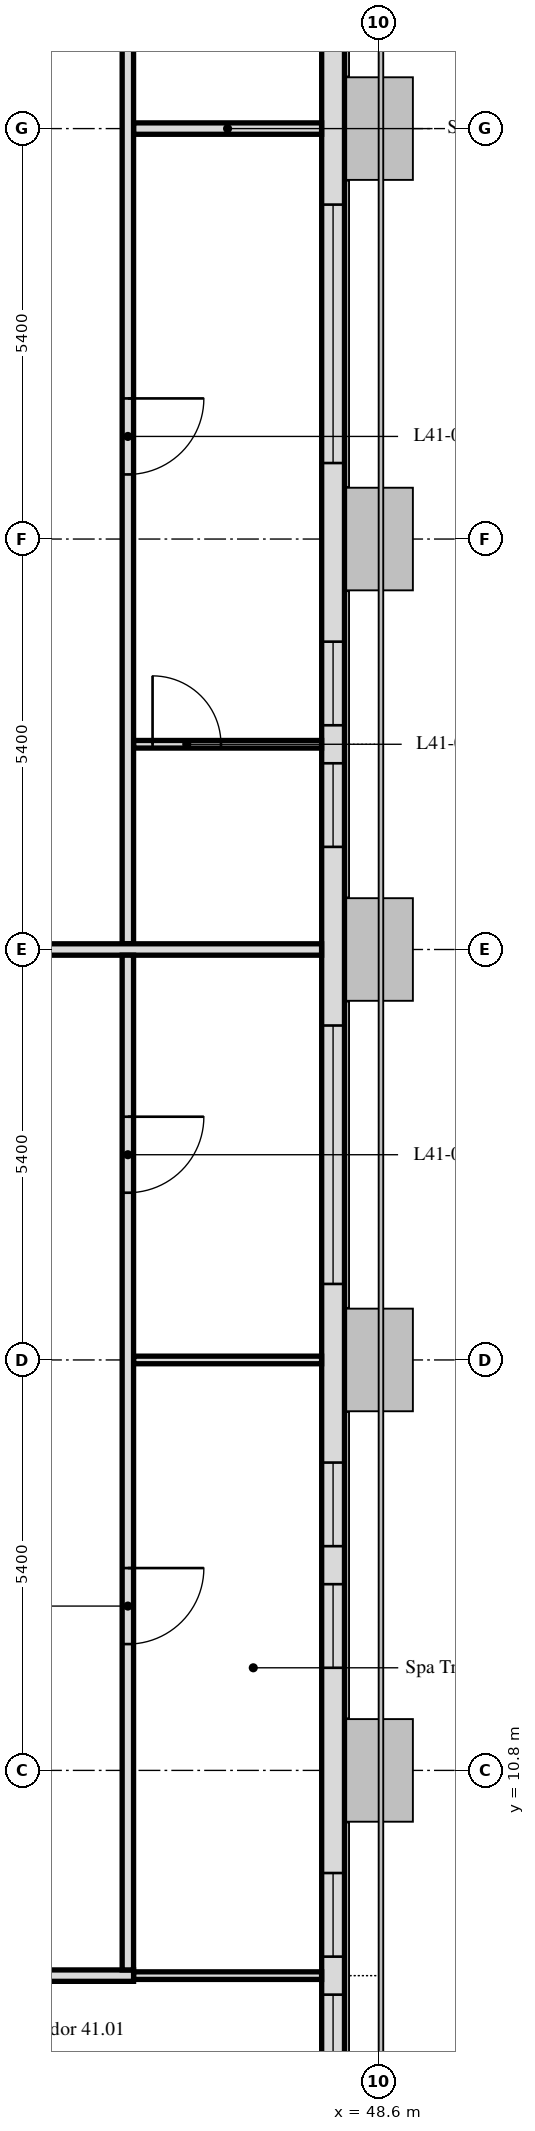
"""IFC4 building model, lengths in metres.
Left out: names, types, materials, properties, quantities, classifications, styles, units other than length and angle.
Written with IfcOpenShell. Run it as: python <this file> out.ifc"""

import sys

from ifc_helpers import new_model, si_unit, direction, frame, frame_2d, origin, place, context, subcontext, project, spatial, rectangle, extrude, element, fill, save


model = new_model("IFC4")
c1 = context("Model", 3, precision=1e-05, world=origin(), true_north=direction((0.0, 1.0)))
c2 = subcontext(c1, "Body", "Model", "MODEL_VIEW")
j1 = project(units=[si_unit("LENGTHUNIT", "METRE"), si_unit("PLANEANGLEUNIT", "RADIAN")], contexts=[c1])
p1 = place(None, origin())
s1 = spatial("IfcSite", under=j1, at=p1, CompositionType="ELEMENT")
p2 = place(p1, origin())
s2 = spatial("IfcBuilding", under=s1, at=p2, CompositionType="ELEMENT")
p3 = place(p2, frame((0.0, 0.0, 172.6)))
s3 = spatial("IfcBuildingStorey", under=s2, at=p3, CompositionType="ELEMENT", Elevation=172.6)
p4 = place(p3, frame((48.0, 5.586, 0.0), z_axis=(0.0, 0.0, 1.0), x_axis=(0.0, 1.0, 0.0)))
e1 = element("IfcWall", 1, at=p4, inside=s3, PredefinedType="SOLIDWALL", context=c2, shape_type="SweptSolid", body=[
    extrude(rectangle(XDim=32.027, YDim=0.3, at=frame_2d((16.014, 0.0))), origin(), (0.0, 0.0, 1.0), 2.8),
])
p5 = place(p4, frame((1.164, 0.0, 0.9)))
e2 = element("IfcOpeningElement", 2, at=p5, cuts=e1, PredefinedType="OPENING", context=c2, shape_type="SweptSolid", body=[
    extrude(rectangle(XDim=1.1, YDim=1.7, at=frame_2d((0.55, 0.85))), frame((0.0, 0.16, 0.0), z_axis=(0.0, -1.0, 0.0), x_axis=(1.0, 0.0, 0.0)), (0.0, 0.0, 1.0), 0.32),
])
p6 = place(p4, frame((2.764, 0.0, 0.9)))
e3 = element("IfcOpeningElement", 3, at=p6, cuts=e1, PredefinedType="OPENING", context=c2, shape_type="SweptSolid", body=[
    extrude(rectangle(XDim=1.1, YDim=1.7, at=frame_2d((0.55, 0.85))), frame((0.0, 0.16, 0.0), z_axis=(0.0, -1.0, 0.0), x_axis=(1.0, 0.0, 0.0)), (0.0, 0.0, 1.0), 0.32),
])
p7 = place(p4, frame((6.564, 0.0, 0.9)))
e4 = element("IfcOpeningElement", 4, at=p7, cuts=e1, PredefinedType="OPENING", context=c2, shape_type="SweptSolid", body=[
    extrude(rectangle(XDim=1.1, YDim=1.7, at=frame_2d((0.55, 0.85))), frame((0.0, 0.16, 0.0), z_axis=(0.0, -1.0, 0.0), x_axis=(1.0, 0.0, 0.0)), (0.0, 0.0, 1.0), 0.32),
])
p8 = place(p4, frame((8.164, 0.0, 0.9)))
e5 = element("IfcOpeningElement", 5, at=p8, cuts=e1, PredefinedType="OPENING", context=c2, shape_type="SweptSolid", body=[
    extrude(rectangle(XDim=1.1, YDim=1.7, at=frame_2d((0.55, 0.85))), frame((0.0, 0.16, 0.0), z_axis=(0.0, -1.0, 0.0), x_axis=(1.0, 0.0, 0.0)), (0.0, 0.0, 1.0), 0.32),
])
p9 = place(p4, frame((11.614, 0.0, 0.9)))
e6 = element("IfcOpeningElement", 6, at=p9, cuts=e1, PredefinedType="OPENING", context=c2, shape_type="SweptSolid", body=[
    extrude(rectangle(XDim=3.4, YDim=1.7, at=frame_2d((1.7, 0.85))), frame((0.0, 0.16, 0.0), z_axis=(0.0, -1.0, 0.0), x_axis=(1.0, 0.0, 0.0)), (0.0, 0.0, 1.0), 0.32),
])
p10 = place(p4, frame((17.364, 0.0, 0.9)))
e7 = element("IfcOpeningElement", 7, at=p10, cuts=e1, PredefinedType="OPENING", context=c2, shape_type="SweptSolid", body=[
    extrude(rectangle(XDim=1.1, YDim=1.7, at=frame_2d((0.55, 0.85))), frame((0.0, 0.16, 0.0), z_axis=(0.0, -1.0, 0.0), x_axis=(1.0, 0.0, 0.0)), (0.0, 0.0, 1.0), 0.32),
])
p11 = place(p4, frame((18.964, 0.0, 0.9)))
e8 = element("IfcOpeningElement", 8, at=p11, cuts=e1, PredefinedType="OPENING", context=c2, shape_type="SweptSolid", body=[
    extrude(rectangle(XDim=1.1, YDim=1.7, at=frame_2d((0.55, 0.85))), frame((0.0, 0.16, 0.0), z_axis=(0.0, -1.0, 0.0), x_axis=(1.0, 0.0, 0.0)), (0.0, 0.0, 1.0), 0.32),
])
p12 = place(p4, frame((22.414, 0.0, 0.9)))
e9 = element("IfcOpeningElement", 9, at=p12, cuts=e1, PredefinedType="OPENING", context=c2, shape_type="SweptSolid", body=[
    extrude(rectangle(XDim=3.4, YDim=1.7, at=frame_2d((1.7, 0.85))), frame((0.0, 0.16, 0.0), z_axis=(0.0, -1.0, 0.0), x_axis=(1.0, 0.0, 0.0)), (0.0, 0.0, 1.0), 0.32),
])
p13 = place(p4, frame((28.164, 0.0, 0.9)))
e10 = element("IfcOpeningElement", 10, at=p13, cuts=e1, PredefinedType="OPENING", context=c2, shape_type="SweptSolid", body=[
    extrude(rectangle(XDim=1.1, YDim=1.7, at=frame_2d((0.55, 0.85))), frame((0.0, 0.16, 0.0), z_axis=(0.0, -1.0, 0.0), x_axis=(1.0, 0.0, 0.0)), (0.0, 0.0, 1.0), 0.32),
])
p14 = place(p4, frame((29.764, 0.0, 0.9)))
e11 = element("IfcOpeningElement", 11, at=p14, cuts=e1, PredefinedType="OPENING", context=c2, shape_type="SweptSolid", body=[
    extrude(rectangle(XDim=1.1, YDim=1.7, at=frame_2d((0.55, 0.85))), frame((0.0, 0.16, 0.0), z_axis=(0.0, -1.0, 0.0), x_axis=(1.0, 0.0, 0.0)), (0.0, 0.0, 1.0), 0.32),
])
p15 = place(p3, frame((45.375, 32.4, 0.0), z_axis=(0.0, 0.0, 1.0), x_axis=(1.0, 0.0, 0.0)))
e12 = element("IfcWall", 12, at=p15, inside=s3, PredefinedType="PARTITIONING", context=c2, shape_type="SweptSolid", body=[
    extrude(rectangle(XDim=2.474, YDim=0.15, at=frame_2d((1.237, 0.0))), origin(), (0.0, 0.0, 1.0), 2.2),
])
p16 = place(p3, frame((45.375, 24.3, 0.0), z_axis=(0.0, 0.0, 1.0), x_axis=(1.0, 0.0, 0.0)))
e13 = element("IfcWall", 13, at=p16, inside=s3, PredefinedType="PARTITIONING", context=c2, shape_type="SweptSolid", body=[
    extrude(rectangle(XDim=2.474, YDim=0.1, at=frame_2d((1.237, 0.0))), origin(), (0.0, 0.0, 1.0), 2.8),
])
p17 = place(p16, frame((0.25, 0.0, 0.0)))
e14 = element("IfcOpeningElement", 14, at=p17, cuts=e13, PredefinedType="OPENING", context=c2, shape_type="SweptSolid", body=[
    extrude(rectangle(XDim=0.9, YDim=2.1, at=frame_2d((0.45, 1.05))), frame((0.0, 0.05, 0.0), z_axis=(0.0, -1.0, 0.0), x_axis=(1.0, 0.0, 0.0)), (0.0, 0.0, 1.0), 0.1),
])
p18 = place(p3, frame((45.3, 37.275, 0.0), z_axis=(0.0, 0.0, 1.0), x_axis=(0.0, -1.0, 0.0)))
e15 = element("IfcWall", 15, at=p18, inside=s3, PredefinedType="PARTITIONING", context=c2, shape_type="SweptSolid", body=[
    extrude(rectangle(XDim=15.6, YDim=0.15, at=frame_2d((7.8, 0.0))), origin(), (0.0, 0.0, 1.0), 2.2),
])
p19 = place(p18, frame((1.9, 0.0, 0.0)))
e16 = element("IfcOpeningElement", 16, at=p19, cuts=e15, PredefinedType="OPENING", context=c2, shape_type="SweptSolid", body=[
    extrude(rectangle(XDim=1.0, YDim=2.1, at=frame_2d((0.5, 1.05))), frame((0.0, 0.075, 0.0), z_axis=(0.0, -1.0, 0.0), x_axis=(1.0, 0.0, 0.0)), (0.0, 0.0, 1.0), 0.15),
])
p20 = place(p18, frame((8.425, 0.0, 0.0)))
e17 = element("IfcOpeningElement", 17, at=p20, cuts=e15, PredefinedType="OPENING", context=c2, shape_type="SweptSolid", body=[
    extrude(rectangle(XDim=1.0, YDim=2.1, at=frame_2d((0.5, 1.05))), frame((0.0, 0.075, 0.0), z_axis=(0.0, -1.0, 0.0), x_axis=(1.0, 0.0, 0.0)), (0.0, 0.0, 1.0), 0.15),
])
p21 = place(p3, frame((43.2, 21.6, 0.0), z_axis=(0.0, 0.0, 1.0), x_axis=(1.0, 0.0, 0.0)))
e18 = element("IfcWall", 18, at=p21, inside=s3, PredefinedType="PARTITIONING", context=c2, shape_type="SweptSolid", body=[
    extrude(rectangle(XDim=4.649, YDim=0.15, at=frame_2d((2.325, 0.0))), origin(), (0.0, 0.0, 1.0), 2.2),
])
p22 = place(p3, frame((45.375, 8.1, 0.0), z_axis=(0.0, 0.0, 1.0), x_axis=(1.0, 0.0, 0.0)))
e19 = element("IfcWall", 19, at=p22, inside=s3, PredefinedType="PARTITIONING", context=c2, shape_type="SweptSolid", body=[
    extrude(rectangle(XDim=2.474, YDim=0.1, at=frame_2d((1.237, 0.0))), origin(), (0.0, 0.0, 1.0), 2.8),
])
p23 = place(p3, frame((47.849, 16.2, 0.0), z_axis=(0.0, 0.0, 1.0), x_axis=(-1.0, 0.0, 0.0)))
e20 = element("IfcWall", 20, at=p23, inside=s3, PredefinedType="PARTITIONING", context=c2, shape_type="SweptSolid", body=[
    extrude(rectangle(XDim=2.474, YDim=0.1, at=frame_2d((1.237, 0.0))), origin(), (0.0, 0.0, 1.0), 2.2),
])
p24 = place(p3, frame((45.375, 8.1, 0.0), z_axis=(0.0, 0.0, 1.0), x_axis=(-1.0, 0.0, 0.0)))
e21 = element("IfcWall", 21, at=p24, inside=s3, PredefinedType="PARTITIONING", context=c2, shape_type="SweptSolid", body=[
    extrude(rectangle(XDim=39.224, YDim=0.15, at=frame_2d((19.612, 0.0))), origin(), (0.0, 0.0, 1.0), 2.2),
])
p25 = place(p24, frame((36.775, 0.0, 0.0)))
e22 = element("IfcOpeningElement", 22, at=p25, cuts=e21, PredefinedType="OPENING", context=c2, shape_type="SweptSolid", body=[
    extrude(rectangle(XDim=1.0, YDim=2.1, at=frame_2d((0.5, 1.05))), frame((0.0, 0.075, 0.0), z_axis=(0.0, -1.0, 0.0), x_axis=(1.0, 0.0, 0.0)), (0.0, 0.0, 1.0), 0.15),
])
p26 = place(p24, frame((31.375, 0.0, 0.0)))
e23 = element("IfcOpeningElement", 23, at=p26, cuts=e21, PredefinedType="OPENING", context=c2, shape_type="SweptSolid", body=[
    extrude(rectangle(XDim=1.0, YDim=2.1, at=frame_2d((0.5, 1.05))), frame((0.0, 0.075, 0.0), z_axis=(0.0, -1.0, 0.0), x_axis=(1.0, 0.0, 0.0)), (0.0, 0.0, 1.0), 0.15),
])
p27 = place(p24, frame((25.975, 0.0, 0.0)))
e24 = element("IfcOpeningElement", 24, at=p27, cuts=e21, PredefinedType="OPENING", context=c2, shape_type="SweptSolid", body=[
    extrude(rectangle(XDim=1.0, YDim=2.1, at=frame_2d((0.5, 1.05))), frame((0.0, 0.075, 0.0), z_axis=(0.0, -1.0, 0.0), x_axis=(1.0, 0.0, 0.0)), (0.0, 0.0, 1.0), 0.15),
])
p28 = place(p24, frame((20.575, 0.0, 0.0)))
e25 = element("IfcOpeningElement", 25, at=p28, cuts=e21, PredefinedType="OPENING", context=c2, shape_type="SweptSolid", body=[
    extrude(rectangle(XDim=1.0, YDim=2.1, at=frame_2d((0.5, 1.05))), frame((0.0, 0.075, 0.0), z_axis=(0.0, -1.0, 0.0), x_axis=(1.0, 0.0, 0.0)), (0.0, 0.0, 1.0), 0.15),
])
p29 = place(p24, frame((15.175, 0.0, 0.0)))
e26 = element("IfcOpeningElement", 26, at=p29, cuts=e21, PredefinedType="OPENING", context=c2, shape_type="SweptSolid", body=[
    extrude(rectangle(XDim=1.0, YDim=2.1, at=frame_2d((0.5, 1.05))), frame((0.0, 0.075, 0.0), z_axis=(0.0, -1.0, 0.0), x_axis=(1.0, 0.0, 0.0)), (0.0, 0.0, 1.0), 0.15),
])
p30 = place(p24, frame((9.775, 0.0, 0.0)))
e27 = element("IfcOpeningElement", 27, at=p30, cuts=e21, PredefinedType="OPENING", context=c2, shape_type="SweptSolid", body=[
    extrude(rectangle(XDim=1.0, YDim=2.1, at=frame_2d((0.5, 1.05))), frame((0.0, 0.075, 0.0), z_axis=(0.0, -1.0, 0.0), x_axis=(1.0, 0.0, 0.0)), (0.0, 0.0, 1.0), 0.15),
])
p31 = place(p24, frame((3.325, 0.0, 0.0)))
e28 = element("IfcOpeningElement", 28, at=p31, cuts=e21, PredefinedType="OPENING", context=c2, shape_type="SweptSolid", body=[
    extrude(rectangle(XDim=1.0, YDim=2.1, at=frame_2d((0.5, 1.05))), frame((0.0, 0.075, 0.0), z_axis=(0.0, -1.0, 0.0), x_axis=(1.0, 0.0, 0.0)), (0.0, 0.0, 1.0), 0.15),
])
p32 = place(p3, frame((45.3, 21.525, 0.0), z_axis=(0.0, 0.0, 1.0), x_axis=(0.0, -1.0, 0.0)))
e29 = element("IfcWall", 29, at=p32, inside=s3, PredefinedType="PARTITIONING", context=c2, shape_type="SweptSolid", body=[
    extrude(rectangle(XDim=13.35, YDim=0.15, at=frame_2d((6.675, 0.0))), origin(), (0.0, 0.0, 1.0), 2.2),
])
p33 = place(p32, frame((8.063, 0.0, 0.0)))
e30 = element("IfcOpeningElement", 30, at=p33, cuts=e29, PredefinedType="OPENING", context=c2, shape_type="SweptSolid", body=[
    extrude(rectangle(XDim=1.0, YDim=2.1, at=frame_2d((0.5, 1.05))), frame((0.0, 0.075, 0.0), z_axis=(0.0, -1.0, 0.0), x_axis=(1.0, 0.0, 0.0)), (0.0, 0.0, 1.0), 0.15),
])
p34 = place(p32, frame((2.125, 0.0, 0.0)))
e31 = element("IfcOpeningElement", 31, at=p34, cuts=e29, PredefinedType="OPENING", context=c2, shape_type="SweptSolid", body=[
    extrude(rectangle(XDim=1.0, YDim=2.1, at=frame_2d((0.5, 1.05))), frame((0.0, 0.075, 0.0), z_axis=(0.0, -1.0, 0.0), x_axis=(1.0, 0.0, 0.0)), (0.0, 0.0, 1.0), 0.15),
])
p35 = place(p5, origin())
e32 = element("IfcWindow", 32, at=p35, inside=s3, PartitioningType="SINGLE_PANEL", PredefinedType="WINDOW", context=c2, shape_type="SweptSolid", body=[
    extrude(rectangle(XDim=1.1, YDim=1.7, at=frame_2d((0.55, 0.85))), frame((0.0, 0.03, 0.0), z_axis=(0.0, -1.0, 0.0), x_axis=(1.0, 0.0, 0.0)), (0.0, 0.0, 1.0), 0.06),
])
fill(e2, e32)
p36 = place(p6, origin())
e33 = element("IfcWindow", 33, at=p36, inside=s3, PartitioningType="SINGLE_PANEL", PredefinedType="WINDOW", context=c2, shape_type="SweptSolid", body=[
    extrude(rectangle(XDim=1.1, YDim=1.7, at=frame_2d((0.55, 0.85))), frame((0.0, 0.03, 0.0), z_axis=(0.0, -1.0, 0.0), x_axis=(1.0, 0.0, 0.0)), (0.0, 0.0, 1.0), 0.06),
])
fill(e3, e33)
p37 = place(p7, origin())
e34 = element("IfcWindow", 34, at=p37, inside=s3, PartitioningType="SINGLE_PANEL", PredefinedType="WINDOW", context=c2, shape_type="SweptSolid", body=[
    extrude(rectangle(XDim=1.1, YDim=1.7, at=frame_2d((0.55, 0.85))), frame((0.0, 0.03, 0.0), z_axis=(0.0, -1.0, 0.0), x_axis=(1.0, 0.0, 0.0)), (0.0, 0.0, 1.0), 0.06),
])
fill(e4, e34)
p38 = place(p8, origin())
e35 = element("IfcWindow", 35, at=p38, inside=s3, PartitioningType="SINGLE_PANEL", PredefinedType="WINDOW", context=c2, shape_type="SweptSolid", body=[
    extrude(rectangle(XDim=1.1, YDim=1.7, at=frame_2d((0.55, 0.85))), frame((0.0, 0.03, 0.0), z_axis=(0.0, -1.0, 0.0), x_axis=(1.0, 0.0, 0.0)), (0.0, 0.0, 1.0), 0.06),
])
fill(e5, e35)
p39 = place(p9, origin())
e36 = element("IfcWindow", 36, at=p39, inside=s3, PartitioningType="SINGLE_PANEL", PredefinedType="WINDOW", context=c2, shape_type="SweptSolid", body=[
    extrude(rectangle(XDim=3.4, YDim=1.7, at=frame_2d((1.7, 0.85))), frame((0.0, 0.03, 0.0), z_axis=(0.0, -1.0, 0.0), x_axis=(1.0, 0.0, 0.0)), (0.0, 0.0, 1.0), 0.06),
])
fill(e6, e36)
p40 = place(p10, origin())
e37 = element("IfcWindow", 37, at=p40, inside=s3, PartitioningType="SINGLE_PANEL", PredefinedType="WINDOW", context=c2, shape_type="SweptSolid", body=[
    extrude(rectangle(XDim=1.1, YDim=1.7, at=frame_2d((0.55, 0.85))), frame((0.0, 0.03, 0.0), z_axis=(0.0, -1.0, 0.0), x_axis=(1.0, 0.0, 0.0)), (0.0, 0.0, 1.0), 0.06),
])
fill(e7, e37)
p41 = place(p11, origin())
e38 = element("IfcWindow", 38, at=p41, inside=s3, PartitioningType="SINGLE_PANEL", PredefinedType="WINDOW", context=c2, shape_type="SweptSolid", body=[
    extrude(rectangle(XDim=1.1, YDim=1.7, at=frame_2d((0.55, 0.85))), frame((0.0, 0.03, 0.0), z_axis=(0.0, -1.0, 0.0), x_axis=(1.0, 0.0, 0.0)), (0.0, 0.0, 1.0), 0.06),
])
fill(e8, e38)
p42 = place(p12, origin())
e39 = element("IfcWindow", 39, at=p42, inside=s3, PartitioningType="SINGLE_PANEL", PredefinedType="WINDOW", context=c2, shape_type="SweptSolid", body=[
    extrude(rectangle(XDim=3.4, YDim=1.7, at=frame_2d((1.7, 0.85))), frame((0.0, 0.03, 0.0), z_axis=(0.0, -1.0, 0.0), x_axis=(1.0, 0.0, 0.0)), (0.0, 0.0, 1.0), 0.06),
])
fill(e9, e39)
p43 = place(p17, origin())
e40 = element("IfcDoor", 40, at=p43, inside=s3, OperationType="SINGLE_SWING_RIGHT", PredefinedType="DOOR", context=c2, shape_type="SweptSolid", body=[
    extrude(rectangle(XDim=0.9, YDim=2.1, at=frame_2d((0.45, 1.05))), frame((0.0, 0.025, 0.0), z_axis=(0.0, -1.0, 0.0), x_axis=(1.0, 0.0, 0.0)), (0.0, 0.0, 1.0), 0.05),
])
fill(e14, e40)
p44 = place(p33, origin())
e41 = element("IfcDoor", 41, at=p44, inside=s3, OperationType="SINGLE_SWING_LEFT", PredefinedType="DOOR", context=c2, shape_type="SweptSolid", body=[
    extrude(rectangle(XDim=1.0, YDim=2.1, at=frame_2d((0.5, 1.05))), frame((0.0, 0.025, 0.0), z_axis=(0.0, -1.0, 0.0), x_axis=(1.0, 0.0, 0.0)), (0.0, 0.0, 1.0), 0.05),
])
fill(e30, e41)
p45 = place(p34, origin())
e42 = element("IfcDoor", 42, at=p45, inside=s3, OperationType="SINGLE_SWING_RIGHT", PredefinedType="DOOR", context=c2, shape_type="SweptSolid", body=[
    extrude(rectangle(XDim=1.0, YDim=2.1, at=frame_2d((0.5, 1.05))), frame((0.0, 0.025, 0.0), z_axis=(0.0, -1.0, 0.0), x_axis=(1.0, 0.0, 0.0)), (0.0, 0.0, 1.0), 0.05),
])
fill(e31, e42)
p46 = place(p20, origin())
e43 = element("IfcDoor", 43, at=p46, inside=s3, OperationType="SINGLE_SWING_LEFT", PredefinedType="DOOR", context=c2, shape_type="SweptSolid", body=[
    extrude(rectangle(XDim=1.0, YDim=2.1, at=frame_2d((0.5, 1.05))), frame((0.0, 0.025, 0.0), z_axis=(0.0, -1.0, 0.0), x_axis=(1.0, 0.0, 0.0)), (0.0, 0.0, 1.0), 0.05),
])
fill(e17, e43)
save(model, sys.argv[1])
